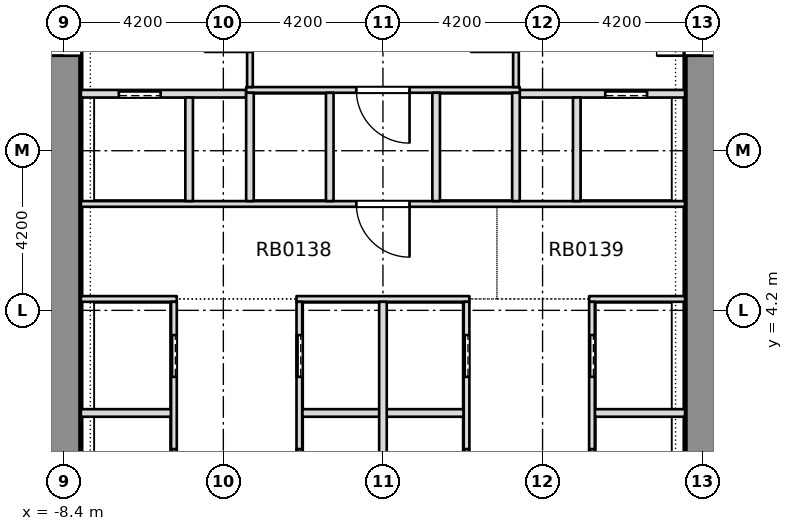
"""IFC4 building model, lengths in metres.
Left out: names, types, materials, properties, quantities, classifications, styles, units other than length and angle.
Written with IfcOpenShell. Run it as: python <this file> out.ifc"""

import sys

from ifc_helpers import new_model, si_unit, direction, frame, frame_2d, origin, place, context, subcontext, project, spatial, rectangle, extrude, element, fill, save


model = new_model("IFC4")
c1 = context("Model", 3, precision=1e-05, world=origin(), true_north=direction((0.0, 1.0)))
c2 = subcontext(c1, "Body", "Model", "MODEL_VIEW")
j1 = project(units=[si_unit("LENGTHUNIT", "METRE"), si_unit("PLANEANGLEUNIT", "RADIAN")], contexts=[c1])
p1 = place(None, origin())
s1 = spatial("IfcSite", under=j1, at=p1, CompositionType="ELEMENT")
p2 = place(p1, origin())
s2 = spatial("IfcBuilding", under=s1, at=p2, CompositionType="ELEMENT")
p3 = place(p2, frame((0.0, 0.0, -4.2)))
s3 = spatial("IfcBuildingStorey", under=s2, at=p3, CompositionType="ELEMENT", Elevation=-4.2)
p4 = place(p3, frame((-8.4, -7.5, -0.35), z_axis=(0.0, 0.0, 1.0), x_axis=(0.0, 1.0, 0.0)))
e1 = element("IfcWall", 1, at=p4, inside=s3, PredefinedType="SHEAR", context=c2, shape_type="SweptSolid", body=[
    extrude(rectangle(XDim=28.35, YDim=0.9, at=frame_2d((14.175, 0.0))), origin(), (0.0, 0.0, 1.0), 4.1),
])
p5 = place(p4, frame((18.4, 0.0, 0.35)))
e2 = element("IfcOpeningElement", 2, at=p5, cuts=e1, PredefinedType="OPENING", context=c2, shape_type="SweptSolid", body=[
    extrude(rectangle(XDim=1.2, YDim=2.1, at=frame_2d((0.6, 1.05))), frame((0.0, 0.46, 0.0), z_axis=(0.0, -1.0, 0.0), x_axis=(1.0, 0.0, 0.0)), (0.0, 0.0, 1.0), 0.92),
])
p6 = place(p3, frame((8.4, -7.5, -0.35), z_axis=(0.0, 0.0, 1.0), x_axis=(0.0, 1.0, 0.0)))
e3 = element("IfcWall", 3, at=p6, inside=s3, PredefinedType="SHEAR", context=c2, shape_type="SweptSolid", body=[
    extrude(rectangle(XDim=28.35, YDim=0.9, at=frame_2d((14.175, 0.0))), origin(), (0.0, 0.0, 1.0), 4.1),
])
p7 = place(p6, frame((18.4, 0.0, 0.35)))
e4 = element("IfcOpeningElement", 4, at=p7, cuts=e3, PredefinedType="OPENING", context=c2, shape_type="SweptSolid", body=[
    extrude(rectangle(XDim=1.2, YDim=2.1, at=frame_2d((0.6, 1.05))), frame((0.0, 0.46, 0.0), z_axis=(0.0, -1.0, 0.0), x_axis=(1.0, 0.0, 0.0)), (0.0, 0.0, 1.0), 0.92),
])
p8 = place(p3, frame((-7.949, 1.5, 0.0), z_axis=(0.0, 0.0, 1.0), x_axis=(1.0, 0.0, 0.0)))
e5 = element("IfcWall", 5, at=p8, inside=s3, PredefinedType="PARTITIONING", context=c2, shape_type="SweptSolid", body=[
    extrude(rectangle(XDim=2.374, YDim=0.2, at=frame_2d((1.187, 0.0))), origin(), (0.0, 0.0, 1.0), 3.75),
])
p9 = place(p3, frame((-2.125, 1.5, 0.0), z_axis=(0.0, 0.0, 1.0), x_axis=(1.0, 0.0, 0.0)))
e6 = element("IfcWall", 6, at=p9, inside=s3, PredefinedType="PARTITIONING", context=c2, shape_type="SweptSolid", body=[
    extrude(rectangle(XDim=4.25, YDim=0.2, at=frame_2d((2.125, 0.0))), origin(), (0.0, 0.0, 1.0), 3.75),
])
p10 = place(p3, frame((5.575, 1.5, 0.0), z_axis=(0.0, 0.0, 1.0), x_axis=(1.0, 0.0, 0.0)))
e7 = element("IfcWall", 7, at=p10, inside=s3, PredefinedType="PARTITIONING", context=c2, shape_type="SweptSolid", body=[
    extrude(rectangle(XDim=2.374, YDim=0.2, at=frame_2d((1.187, 0.0))), origin(), (0.0, 0.0, 1.0), 3.75),
])
p11 = place(p3, frame((-7.949, 4.5, 0.0), z_axis=(0.0, 0.0, 1.0), x_axis=(1.0, 0.0, 0.0)))
e8 = element("IfcWall", 8, at=p11, inside=s3, PredefinedType="PARTITIONING", context=c2, shape_type="SweptSolid", body=[
    extrude(rectangle(XDim=2.524, YDim=0.15, at=frame_2d((1.262, 0.0))), origin(), (0.0, 0.0, 1.0), 3.75),
])
p12 = place(p3, frame((-2.275, 4.5, 0.0), z_axis=(0.0, 0.0, 1.0), x_axis=(1.0, 0.0, 0.0)))
e9 = element("IfcWall", 9, at=p12, inside=s3, PredefinedType="PARTITIONING", context=c2, shape_type="SweptSolid", body=[
    extrude(rectangle(XDim=4.55, YDim=0.15, at=frame_2d((2.275, 0.0))), origin(), (0.0, 0.0, 1.0), 3.75),
])
p13 = place(p3, frame((5.425, 4.5, 0.0), z_axis=(0.0, 0.0, 1.0), x_axis=(1.0, 0.0, 0.0)))
e10 = element("IfcWall", 10, at=p13, inside=s3, PredefinedType="PARTITIONING", context=c2, shape_type="SweptSolid", body=[
    extrude(rectangle(XDim=2.524, YDim=0.15, at=frame_2d((1.262, 0.0))), origin(), (0.0, 0.0, 1.0), 3.75),
])
p14 = place(p3, frame((-7.949, 7.0, 0.0), z_axis=(0.0, 0.0, 1.0), x_axis=(1.0, 0.0, 0.0)))
e11 = element("IfcWall", 11, at=p14, inside=s3, PredefinedType="PARTITIONING", context=c2, shape_type="SweptSolid", body=[
    extrude(rectangle(XDim=15.898, YDim=0.15, at=frame_2d((7.949, 0.0))), origin(), (0.0, 0.0, 1.0), 3.75),
])
p15 = place(p14, frame((7.249, 0.0, 0.0)))
e12 = element("IfcOpeningElement", 12, at=p15, cuts=e11, PredefinedType="OPENING", context=c2, shape_type="SweptSolid", body=[
    extrude(rectangle(XDim=1.4, YDim=2.1, at=frame_2d((0.7, 1.05))), frame((0.0, 0.085, 0.0), z_axis=(0.0, -1.0, 0.0), x_axis=(1.0, 0.0, 0.0)), (0.0, 0.0, 1.0), 0.17),
])
p16 = place(p3, frame((-7.949, 9.9, 0.0), z_axis=(0.0, 0.0, 1.0), x_axis=(1.0, 0.0, 0.0)))
e13 = element("IfcWall", 13, at=p16, inside=s3, PredefinedType="PARTITIONING", context=c2, shape_type="SweptSolid", body=[
    extrude(rectangle(XDim=4.349, YDim=0.2, at=frame_2d((2.174, 0.0))), origin(), (0.0, 0.0, 1.0), 3.75),
])
p17 = place(p16, frame((0.999, 0.0, 0.0)))
e14 = element("IfcOpeningElement", 14, at=p17, cuts=e13, PredefinedType="OPENING", context=c2, shape_type="SweptSolid", body=[
    extrude(rectangle(XDim=1.1, YDim=2.1, at=frame_2d((0.55, 1.05))), frame((0.0, 0.11, 0.0), z_axis=(0.0, -1.0, 0.0), x_axis=(1.0, 0.0, 0.0)), (0.0, 0.0, 1.0), 0.22),
])
p18 = place(p3, frame((3.6, 9.9, 0.0), z_axis=(0.0, 0.0, 1.0), x_axis=(1.0, 0.0, 0.0)))
e15 = element("IfcWall", 15, at=p18, inside=s3, PredefinedType="PARTITIONING", context=c2, shape_type="SweptSolid", body=[
    extrude(rectangle(XDim=4.349, YDim=0.2, at=frame_2d((2.174, 0.0))), origin(), (0.0, 0.0, 1.0), 3.75),
])
p19 = place(p18, frame((2.25, 0.0, 0.0)))
e16 = element("IfcOpeningElement", 16, at=p19, cuts=e15, PredefinedType="OPENING", context=c2, shape_type="SweptSolid", body=[
    extrude(rectangle(XDim=1.1, YDim=2.1, at=frame_2d((0.55, 1.05))), frame((0.0, 0.11, 0.0), z_axis=(0.0, -1.0, 0.0), x_axis=(1.0, 0.0, 0.0)), (0.0, 0.0, 1.0), 0.22),
])
p20 = place(p3, frame((-3.6, 10.0, 0.0), z_axis=(0.0, 0.0, 1.0), x_axis=(1.0, 0.0, 0.0)))
e17 = element("IfcWall", 17, at=p20, inside=s3, PredefinedType="PARTITIONING", context=c2, shape_type="SweptSolid", body=[
    extrude(rectangle(XDim=7.2, YDim=0.15, at=frame_2d((3.6, 0.0))), origin(), (0.0, 0.0, 1.0), 3.75),
])
p21 = place(p20, frame((2.9, 0.0, 0.0)))
e18 = element("IfcOpeningElement", 18, at=p21, cuts=e17, PredefinedType="OPENING", context=c2, shape_type="SweptSolid", body=[
    extrude(rectangle(XDim=1.4, YDim=2.1, at=frame_2d((0.7, 1.05))), frame((0.0, 0.085, 0.0), z_axis=(0.0, -1.0, 0.0), x_axis=(1.0, 0.0, 0.0)), (0.0, 0.0, 1.0), 0.17),
])
p22 = place(p3, frame((-5.5, -7.499, 0.0), z_axis=(0.0, 0.0, 1.0), x_axis=(0.0, 1.0, 0.0)))
e19 = element("IfcWall", 19, at=p22, inside=s3, PredefinedType="PARTITIONING", context=c2, shape_type="SweptSolid", body=[
    extrude(rectangle(XDim=11.924, YDim=0.15, at=frame_2d((5.962, 0.0))), origin(), (0.0, 0.0, 1.0), 3.75),
])
p23 = place(p22, frame((0.949, 0.0, 0.0)))
e20 = element("IfcOpeningElement", 20, at=p23, cuts=e19, PredefinedType="OPENING", context=c2, shape_type="SweptSolid", body=[
    extrude(rectangle(XDim=1.1, YDim=2.1, at=frame_2d((0.55, 1.05))), frame((0.0, 0.085, 0.0), z_axis=(0.0, -1.0, 0.0), x_axis=(1.0, 0.0, 0.0)), (0.0, 0.0, 1.0), 0.17),
])
p24 = place(p22, frame((3.949, 0.0, 0.0)))
e21 = element("IfcOpeningElement", 21, at=p24, cuts=e19, PredefinedType="OPENING", context=c2, shape_type="SweptSolid", body=[
    extrude(rectangle(XDim=1.1, YDim=2.1, at=frame_2d((0.55, 1.05))), frame((0.0, 0.085, 0.0), z_axis=(0.0, -1.0, 0.0), x_axis=(1.0, 0.0, 0.0)), (0.0, 0.0, 1.0), 0.17),
])
p25 = place(p22, frame((6.949, 0.0, 0.0)))
e22 = element("IfcOpeningElement", 22, at=p25, cuts=e19, PredefinedType="OPENING", context=c2, shape_type="SweptSolid", body=[
    extrude(rectangle(XDim=1.1, YDim=2.1, at=frame_2d((0.55, 1.05))), frame((0.0, 0.085, 0.0), z_axis=(0.0, -1.0, 0.0), x_axis=(1.0, 0.0, 0.0)), (0.0, 0.0, 1.0), 0.17),
])
p26 = place(p22, frame((9.949, 0.0, 0.0)))
e23 = element("IfcOpeningElement", 23, at=p26, cuts=e19, PredefinedType="OPENING", context=c2, shape_type="SweptSolid", body=[
    extrude(rectangle(XDim=1.1, YDim=2.1, at=frame_2d((0.55, 1.05))), frame((0.0, 0.085, 0.0), z_axis=(0.0, -1.0, 0.0), x_axis=(1.0, 0.0, 0.0)), (0.0, 0.0, 1.0), 0.17),
])
p27 = place(p3, frame((-5.1, 7.075, 0.0), z_axis=(0.0, 0.0, 1.0), x_axis=(0.0, 1.0, 0.0)))
e24 = element("IfcWall", 24, at=p27, inside=s3, PredefinedType="PARTITIONING", context=c2, shape_type="SweptSolid", body=[
    extrude(rectangle(XDim=2.725, YDim=0.2, at=frame_2d((1.363, 0.0))), origin(), (0.0, 0.0, 1.0), 3.75),
])
p28 = place(p3, frame((-3.5, 7.075, 0.0), z_axis=(0.0, 0.0, 1.0), x_axis=(0.0, 1.0, 0.0)))
e25 = element("IfcWall", 25, at=p28, inside=s3, PredefinedType="PARTITIONING", context=c2, shape_type="SweptSolid", body=[
    extrude(rectangle(XDim=2.85, YDim=0.2, at=frame_2d((1.425, 0.0))), origin(), (0.0, 0.0, 1.0), 3.75),
])
p29 = place(p3, frame((-3.5, 10.075, 0.0), z_axis=(0.0, 0.0, 1.0), x_axis=(0.0, 1.0, 0.0)))
e26 = element("IfcWall", 26, at=p29, inside=s3, PredefinedType="PARTITIONING", context=c2, shape_type="SweptSolid", body=[
    extrude(rectangle(XDim=3.075, YDim=0.15, at=frame_2d((1.538, 0.0))), origin(), (0.0, 0.0, 1.0), 3.75),
])
p30 = place(p29, frame((0.925, 0.0, 0.0)))
e27 = element("IfcOpeningElement", 27, at=p30, cuts=e26, PredefinedType="OPENING", context=c2, shape_type="SweptSolid", body=[
    extrude(rectangle(XDim=1.2, YDim=2.1, at=frame_2d((0.6, 1.05))), frame((0.0, 0.085, 0.0), z_axis=(0.0, -1.0, 0.0), x_axis=(1.0, 0.0, 0.0)), (0.0, 0.0, 1.0), 0.17),
])
p31 = place(p3, frame((-2.2, -7.499, 0.0), z_axis=(0.0, 0.0, 1.0), x_axis=(0.0, 1.0, 0.0)))
e28 = element("IfcWall", 28, at=p31, inside=s3, PredefinedType="PARTITIONING", context=c2, shape_type="SweptSolid", body=[
    extrude(rectangle(XDim=11.924, YDim=0.15, at=frame_2d((5.962, 0.0))), origin(), (0.0, 0.0, 1.0), 3.75),
])
p32 = place(p31, frame((0.949, 0.0, 0.0)))
e29 = element("IfcOpeningElement", 29, at=p32, cuts=e28, PredefinedType="OPENING", context=c2, shape_type="SweptSolid", body=[
    extrude(rectangle(XDim=1.1, YDim=2.1, at=frame_2d((0.55, 1.05))), frame((0.0, 0.085, 0.0), z_axis=(0.0, -1.0, 0.0), x_axis=(1.0, 0.0, 0.0)), (0.0, 0.0, 1.0), 0.17),
])
p33 = place(p31, frame((3.949, 0.0, 0.0)))
e30 = element("IfcOpeningElement", 30, at=p33, cuts=e28, PredefinedType="OPENING", context=c2, shape_type="SweptSolid", body=[
    extrude(rectangle(XDim=1.1, YDim=2.1, at=frame_2d((0.55, 1.05))), frame((0.0, 0.085, 0.0), z_axis=(0.0, -1.0, 0.0), x_axis=(1.0, 0.0, 0.0)), (0.0, 0.0, 1.0), 0.17),
])
p34 = place(p31, frame((6.949, 0.0, 0.0)))
e31 = element("IfcOpeningElement", 31, at=p34, cuts=e28, PredefinedType="OPENING", context=c2, shape_type="SweptSolid", body=[
    extrude(rectangle(XDim=1.1, YDim=2.1, at=frame_2d((0.55, 1.05))), frame((0.0, 0.085, 0.0), z_axis=(0.0, -1.0, 0.0), x_axis=(1.0, 0.0, 0.0)), (0.0, 0.0, 1.0), 0.17),
])
p35 = place(p31, frame((9.949, 0.0, 0.0)))
e32 = element("IfcOpeningElement", 32, at=p35, cuts=e28, PredefinedType="OPENING", context=c2, shape_type="SweptSolid", body=[
    extrude(rectangle(XDim=1.1, YDim=2.1, at=frame_2d((0.55, 1.05))), frame((0.0, 0.085, 0.0), z_axis=(0.0, -1.0, 0.0), x_axis=(1.0, 0.0, 0.0)), (0.0, 0.0, 1.0), 0.17),
])
p36 = place(p3, frame((-1.4, 7.075, 0.0), z_axis=(0.0, 0.0, 1.0), x_axis=(0.0, 1.0, 0.0)))
e33 = element("IfcWall", 33, at=p36, inside=s3, PredefinedType="PARTITIONING", context=c2, shape_type="SweptSolid", body=[
    extrude(rectangle(XDim=2.85, YDim=0.2, at=frame_2d((1.425, 0.0))), origin(), (0.0, 0.0, 1.0), 3.75),
])
p37 = place(p3, frame((0.0, -7.499, 0.0), z_axis=(0.0, 0.0, 1.0), x_axis=(0.0, 1.0, 0.0)))
e34 = element("IfcWall", 34, at=p37, inside=s3, PredefinedType="PARTITIONING", context=c2, shape_type="SweptSolid", body=[
    extrude(rectangle(XDim=11.924, YDim=0.2, at=frame_2d((5.962, 0.0))), origin(), (0.0, 0.0, 1.0), 3.75),
])
p38 = place(p3, frame((1.4, 7.075, 0.0), z_axis=(0.0, 0.0, 1.0), x_axis=(0.0, 1.0, 0.0)))
e35 = element("IfcWall", 35, at=p38, inside=s3, PredefinedType="PARTITIONING", context=c2, shape_type="SweptSolid", body=[
    extrude(rectangle(XDim=2.85, YDim=0.2, at=frame_2d((1.425, 0.0))), origin(), (0.0, 0.0, 1.0), 3.75),
])
p39 = place(p3, frame((2.2, -7.499, 0.0), z_axis=(0.0, 0.0, 1.0), x_axis=(0.0, 1.0, 0.0)))
e36 = element("IfcWall", 36, at=p39, inside=s3, PredefinedType="PARTITIONING", context=c2, shape_type="SweptSolid", body=[
    extrude(rectangle(XDim=11.924, YDim=0.15, at=frame_2d((5.962, 0.0))), origin(), (0.0, 0.0, 1.0), 3.75),
])
p40 = place(p39, frame((0.949, 0.0, 0.0)))
e37 = element("IfcOpeningElement", 37, at=p40, cuts=e36, PredefinedType="OPENING", context=c2, shape_type="SweptSolid", body=[
    extrude(rectangle(XDim=1.1, YDim=2.1, at=frame_2d((0.55, 1.05))), frame((0.0, 0.085, 0.0), z_axis=(0.0, -1.0, 0.0), x_axis=(1.0, 0.0, 0.0)), (0.0, 0.0, 1.0), 0.17),
])
p41 = place(p39, frame((3.949, 0.0, 0.0)))
e38 = element("IfcOpeningElement", 38, at=p41, cuts=e36, PredefinedType="OPENING", context=c2, shape_type="SweptSolid", body=[
    extrude(rectangle(XDim=1.1, YDim=2.1, at=frame_2d((0.55, 1.05))), frame((0.0, 0.085, 0.0), z_axis=(0.0, -1.0, 0.0), x_axis=(1.0, 0.0, 0.0)), (0.0, 0.0, 1.0), 0.17),
])
p42 = place(p39, frame((6.949, 0.0, 0.0)))
e39 = element("IfcOpeningElement", 39, at=p42, cuts=e36, PredefinedType="OPENING", context=c2, shape_type="SweptSolid", body=[
    extrude(rectangle(XDim=1.1, YDim=2.1, at=frame_2d((0.55, 1.05))), frame((0.0, 0.085, 0.0), z_axis=(0.0, -1.0, 0.0), x_axis=(1.0, 0.0, 0.0)), (0.0, 0.0, 1.0), 0.17),
])
p43 = place(p39, frame((9.949, 0.0, 0.0)))
e40 = element("IfcOpeningElement", 40, at=p43, cuts=e36, PredefinedType="OPENING", context=c2, shape_type="SweptSolid", body=[
    extrude(rectangle(XDim=1.1, YDim=2.1, at=frame_2d((0.55, 1.05))), frame((0.0, 0.085, 0.0), z_axis=(0.0, -1.0, 0.0), x_axis=(1.0, 0.0, 0.0)), (0.0, 0.0, 1.0), 0.17),
])
p44 = place(p3, frame((3.5, 7.075, 0.0), z_axis=(0.0, 0.0, 1.0), x_axis=(0.0, 1.0, 0.0)))
e41 = element("IfcWall", 41, at=p44, inside=s3, PredefinedType="PARTITIONING", context=c2, shape_type="SweptSolid", body=[
    extrude(rectangle(XDim=2.85, YDim=0.2, at=frame_2d((1.425, 0.0))), origin(), (0.0, 0.0, 1.0), 3.75),
])
p45 = place(p3, frame((3.5, 10.075, 0.0), z_axis=(0.0, 0.0, 1.0), x_axis=(0.0, 1.0, 0.0)))
e42 = element("IfcWall", 42, at=p45, inside=s3, PredefinedType="PARTITIONING", context=c2, shape_type="SweptSolid", body=[
    extrude(rectangle(XDim=3.075, YDim=0.15, at=frame_2d((1.538, 0.0))), origin(), (0.0, 0.0, 1.0), 3.75),
])
p46 = place(p45, frame((0.925, 0.0, 0.0)))
e43 = element("IfcOpeningElement", 43, at=p46, cuts=e42, PredefinedType="OPENING", context=c2, shape_type="SweptSolid", body=[
    extrude(rectangle(XDim=1.2, YDim=2.1, at=frame_2d((0.6, 1.05))), frame((0.0, 0.085, 0.0), z_axis=(0.0, -1.0, 0.0), x_axis=(1.0, 0.0, 0.0)), (0.0, 0.0, 1.0), 0.17),
])
p47 = place(p3, frame((5.1, 7.075, 0.0), z_axis=(0.0, 0.0, 1.0), x_axis=(0.0, 1.0, 0.0)))
e44 = element("IfcWall", 44, at=p47, inside=s3, PredefinedType="PARTITIONING", context=c2, shape_type="SweptSolid", body=[
    extrude(rectangle(XDim=2.725, YDim=0.2, at=frame_2d((1.363, 0.0))), origin(), (0.0, 0.0, 1.0), 3.75),
])
p48 = place(p3, frame((5.5, -7.499, 0.0), z_axis=(0.0, 0.0, 1.0), x_axis=(0.0, 1.0, 0.0)))
e45 = element("IfcWall", 45, at=p48, inside=s3, PredefinedType="PARTITIONING", context=c2, shape_type="SweptSolid", body=[
    extrude(rectangle(XDim=11.924, YDim=0.15, at=frame_2d((5.962, 0.0))), origin(), (0.0, 0.0, 1.0), 3.75),
])
p49 = place(p48, frame((0.949, 0.0, 0.0)))
e46 = element("IfcOpeningElement", 46, at=p49, cuts=e45, PredefinedType="OPENING", context=c2, shape_type="SweptSolid", body=[
    extrude(rectangle(XDim=1.1, YDim=2.1, at=frame_2d((0.55, 1.05))), frame((0.0, 0.085, 0.0), z_axis=(0.0, -1.0, 0.0), x_axis=(1.0, 0.0, 0.0)), (0.0, 0.0, 1.0), 0.17),
])
p50 = place(p48, frame((3.949, 0.0, 0.0)))
e47 = element("IfcOpeningElement", 47, at=p50, cuts=e45, PredefinedType="OPENING", context=c2, shape_type="SweptSolid", body=[
    extrude(rectangle(XDim=1.1, YDim=2.1, at=frame_2d((0.55, 1.05))), frame((0.0, 0.085, 0.0), z_axis=(0.0, -1.0, 0.0), x_axis=(1.0, 0.0, 0.0)), (0.0, 0.0, 1.0), 0.17),
])
p51 = place(p48, frame((6.949, 0.0, 0.0)))
e48 = element("IfcOpeningElement", 48, at=p51, cuts=e45, PredefinedType="OPENING", context=c2, shape_type="SweptSolid", body=[
    extrude(rectangle(XDim=1.1, YDim=2.1, at=frame_2d((0.55, 1.05))), frame((0.0, 0.085, 0.0), z_axis=(0.0, -1.0, 0.0), x_axis=(1.0, 0.0, 0.0)), (0.0, 0.0, 1.0), 0.17),
])
p52 = place(p48, frame((9.949, 0.0, 0.0)))
e49 = element("IfcOpeningElement", 49, at=p52, cuts=e45, PredefinedType="OPENING", context=c2, shape_type="SweptSolid", body=[
    extrude(rectangle(XDim=1.1, YDim=2.1, at=frame_2d((0.55, 1.05))), frame((0.0, 0.085, 0.0), z_axis=(0.0, -1.0, 0.0), x_axis=(1.0, 0.0, 0.0)), (0.0, 0.0, 1.0), 0.17),
])
p53 = place(p25, origin())
e50 = element("IfcDoor", 50, at=p53, inside=s3, OperationType="SLIDING_TO_RIGHT", PredefinedType="DOOR", context=c2, shape_type="SweptSolid", body=[
    extrude(rectangle(XDim=1.1, YDim=2.1, at=frame_2d((0.55, 1.05))), frame((0.0, 0.025, 0.0), z_axis=(0.0, -1.0, 0.0), x_axis=(1.0, 0.0, 0.0)), (0.0, 0.0, 1.0), 0.05),
])
fill(e22, e50)
p54 = place(p26, origin())
e51 = element("IfcDoor", 51, at=p54, inside=s3, OperationType="SLIDING_TO_RIGHT", PredefinedType="DOOR", context=c2, shape_type="SweptSolid", body=[
    extrude(rectangle(XDim=1.1, YDim=2.1, at=frame_2d((0.55, 1.05))), frame((0.0, 0.025, 0.0), z_axis=(0.0, -1.0, 0.0), x_axis=(1.0, 0.0, 0.0)), (0.0, 0.0, 1.0), 0.05),
])
fill(e23, e51)
p55 = place(p34, origin())
e52 = element("IfcDoor", 52, at=p55, inside=s3, OperationType="SLIDING_TO_RIGHT", PredefinedType="DOOR", context=c2, shape_type="SweptSolid", body=[
    extrude(rectangle(XDim=1.1, YDim=2.1, at=frame_2d((0.55, 1.05))), frame((0.0, 0.025, 0.0), z_axis=(0.0, -1.0, 0.0), x_axis=(1.0, 0.0, 0.0)), (0.0, 0.0, 1.0), 0.05),
])
fill(e31, e52)
p56 = place(p35, origin())
e53 = element("IfcDoor", 53, at=p56, inside=s3, OperationType="SLIDING_TO_RIGHT", PredefinedType="DOOR", context=c2, shape_type="SweptSolid", body=[
    extrude(rectangle(XDim=1.1, YDim=2.1, at=frame_2d((0.55, 1.05))), frame((0.0, 0.025, 0.0), z_axis=(0.0, -1.0, 0.0), x_axis=(1.0, 0.0, 0.0)), (0.0, 0.0, 1.0), 0.05),
])
fill(e32, e53)
p57 = place(p42, origin())
e54 = element("IfcDoor", 54, at=p57, inside=s3, OperationType="SLIDING_TO_RIGHT", PredefinedType="DOOR", context=c2, shape_type="SweptSolid", body=[
    extrude(rectangle(XDim=1.1, YDim=2.1, at=frame_2d((0.55, 1.05))), frame((0.0, 0.025, 0.0), z_axis=(0.0, -1.0, 0.0), x_axis=(1.0, 0.0, 0.0)), (0.0, 0.0, 1.0), 0.05),
])
fill(e39, e54)
p58 = place(p43, origin())
e55 = element("IfcDoor", 55, at=p58, inside=s3, OperationType="SLIDING_TO_RIGHT", PredefinedType="DOOR", context=c2, shape_type="SweptSolid", body=[
    extrude(rectangle(XDim=1.1, YDim=2.1, at=frame_2d((0.55, 1.05))), frame((0.0, 0.025, 0.0), z_axis=(0.0, -1.0, 0.0), x_axis=(1.0, 0.0, 0.0)), (0.0, 0.0, 1.0), 0.05),
])
fill(e40, e55)
p59 = place(p51, origin())
e56 = element("IfcDoor", 56, at=p59, inside=s3, OperationType="SLIDING_TO_RIGHT", PredefinedType="DOOR", context=c2, shape_type="SweptSolid", body=[
    extrude(rectangle(XDim=1.1, YDim=2.1, at=frame_2d((0.55, 1.05))), frame((0.0, 0.025, 0.0), z_axis=(0.0, -1.0, 0.0), x_axis=(1.0, 0.0, 0.0)), (0.0, 0.0, 1.0), 0.05),
])
fill(e48, e56)
p60 = place(p52, origin())
e57 = element("IfcDoor", 57, at=p60, inside=s3, OperationType="SLIDING_TO_RIGHT", PredefinedType="DOOR", context=c2, shape_type="SweptSolid", body=[
    extrude(rectangle(XDim=1.1, YDim=2.1, at=frame_2d((0.55, 1.05))), frame((0.0, 0.025, 0.0), z_axis=(0.0, -1.0, 0.0), x_axis=(1.0, 0.0, 0.0)), (0.0, 0.0, 1.0), 0.05),
])
fill(e49, e57)
p61 = place(p17, origin())
e58 = element("IfcDoor", 58, at=p61, inside=s3, OperationType="SLIDING_TO_RIGHT", PredefinedType="DOOR", context=c2, shape_type="SweptSolid", body=[
    extrude(rectangle(XDim=1.1, YDim=2.1, at=frame_2d((0.55, 1.05))), frame((0.0, 0.025, 0.0), z_axis=(0.0, -1.0, 0.0), x_axis=(1.0, 0.0, 0.0)), (0.0, 0.0, 1.0), 0.05),
])
fill(e14, e58)
p62 = place(p19, origin())
e59 = element("IfcDoor", 59, at=p62, inside=s3, OperationType="SLIDING_TO_LEFT", PredefinedType="DOOR", context=c2, shape_type="SweptSolid", body=[
    extrude(rectangle(XDim=1.1, YDim=2.1, at=frame_2d((0.55, 1.05))), frame((0.0, 0.025, 0.0), z_axis=(0.0, -1.0, 0.0), x_axis=(1.0, 0.0, 0.0)), (0.0, 0.0, 1.0), 0.05),
])
fill(e16, e59)
p63 = place(p15, origin())
e60 = element("IfcDoor", 60, at=p63, inside=s3, OperationType="SINGLE_SWING_RIGHT", PredefinedType="DOOR", context=c2, shape_type="SweptSolid", body=[
    extrude(rectangle(XDim=1.4, YDim=2.1, at=frame_2d((0.7, 1.05))), frame((0.0, 0.025, 0.0), z_axis=(0.0, -1.0, 0.0), x_axis=(1.0, 0.0, 0.0)), (0.0, 0.0, 1.0), 0.05),
])
fill(e12, e60)
p64 = place(p21, origin())
e61 = element("IfcDoor", 61, at=p64, inside=s3, OperationType="SINGLE_SWING_RIGHT", PredefinedType="DOOR", context=c2, shape_type="SweptSolid", body=[
    extrude(rectangle(XDim=1.4, YDim=2.1, at=frame_2d((0.7, 1.05))), frame((0.0, 0.025, 0.0), z_axis=(0.0, -1.0, 0.0), x_axis=(1.0, 0.0, 0.0)), (0.0, 0.0, 1.0), 0.05),
])
fill(e18, e61)
p65 = place(p5, origin())
e62 = element("IfcDoor", 62, at=p65, inside=s3, OperationType="SINGLE_SWING_LEFT", PredefinedType="DOOR", context=c2, shape_type="SweptSolid", body=[
    extrude(rectangle(XDim=1.2, YDim=2.1, at=frame_2d((0.6, 1.05))), frame((0.0, 0.025, 0.0), z_axis=(0.0, -1.0, 0.0), x_axis=(1.0, 0.0, 0.0)), (0.0, 0.0, 1.0), 0.05),
])
fill(e2, e62)
p66 = place(p7, origin())
e63 = element("IfcDoor", 63, at=p66, inside=s3, OperationType="SINGLE_SWING_LEFT", PredefinedType="DOOR", context=c2, shape_type="SweptSolid", body=[
    extrude(rectangle(XDim=1.2, YDim=2.1, at=frame_2d((0.6, 1.05))), frame((0.0, 0.025, 0.0), z_axis=(0.0, -1.0, 0.0), x_axis=(1.0, 0.0, 0.0)), (0.0, 0.0, 1.0), 0.05),
])
fill(e4, e63)
save(model, sys.argv[1])
